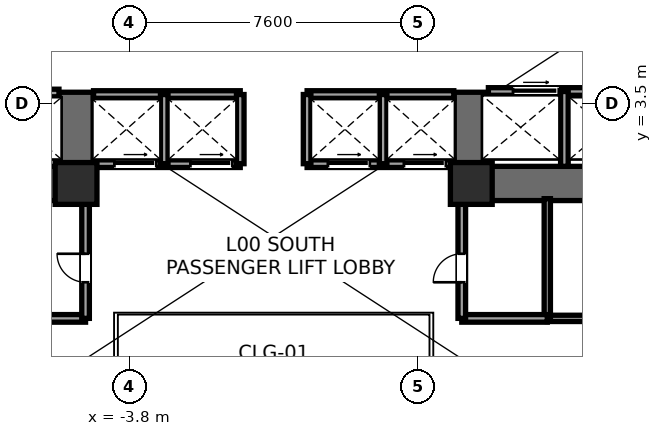
"""IFC4 building model, lengths in metres.
Left out: names, types, materials, properties, quantities, classifications, styles, units other than length and angle.
Written with IfcOpenShell. Run it as: python <this file> out.ifc"""

import sys

from ifc_helpers import new_model, si_unit, direction, frame, frame_2d, origin, origin_2d, place, context, subcontext, project, spatial, rectangle, extrude, element, fill, save


model = new_model("IFC4")
c1 = context("Model", 3, precision=1e-05, world=origin(), true_north=direction((0.0, 1.0)))
c2 = subcontext(c1, "Body", "Model", "MODEL_VIEW")
j1 = project(units=[si_unit("LENGTHUNIT", "METRE"), si_unit("PLANEANGLEUNIT", "RADIAN")], contexts=[c1])
p1 = place(None, origin())
s1 = spatial("IfcSite", under=j1, at=p1, CompositionType="ELEMENT")
p2 = place(p1, origin())
s2 = spatial("IfcBuilding", under=s1, at=p2, CompositionType="ELEMENT")
p3 = place(p2, origin())
s3 = spatial("IfcBuildingStorey", under=s2, at=p3, CompositionType="ELEMENT", Elevation=0.0)
p4 = place(p3, frame((-4.75, 1.4, 0.0), z_axis=(0.0, 0.0, 1.0), x_axis=(-1.0, 0.0, 0.0)))
e1 = element("IfcWall", 1, at=p4, inside=s3, PredefinedType="SHEAR", context=c2, shape_type="SweptSolid", body=[
    extrude(rectangle(XDim=9.3, YDim=0.9, at=frame_2d((4.65, 0.0))), origin(), (0.0, 0.0, 1.0), 6.0),
])
p5 = place(p4, frame((5.55, 0.0, 0.0)))
e2 = element("IfcOpeningElement", 2, at=p5, cuts=e1, PredefinedType="OPENING", context=c2, shape_type="SweptSolid", body=[
    extrude(rectangle(XDim=1.05, YDim=2.15, at=frame_2d((0.525, 1.075))), frame((0.0, 0.46, 0.0), z_axis=(0.0, -1.0, 0.0), x_axis=(1.0, 0.0, 0.0)), (0.0, 0.0, 1.0), 0.92),
])
p6 = place(p4, frame((3.88, 0.0, 0.0)))
e3 = element("IfcOpeningElement", 3, at=p6, cuts=e1, PredefinedType="OPENING", context=c2, shape_type="SweptSolid", body=[
    extrude(rectangle(XDim=1.1, YDim=2.2, at=frame_2d((0.55, 1.1))), frame((0.0, 0.46, 0.0), z_axis=(0.0, -1.0, 0.0), x_axis=(1.0, 0.0, 0.0)), (0.0, 0.0, 1.0), 0.92),
])
p7 = place(p3, frame((-5.2, 0.95, 0.0), z_axis=(0.0, 0.0, 1.0), x_axis=(0.0, 1.0, 0.0)))
e4 = element("IfcWall", 4, at=p7, inside=s3, PredefinedType="SHEAR", context=c2, shape_type="SweptSolid", body=[
    extrude(rectangle(XDim=2.85, YDim=0.9, at=frame_2d((1.425, 0.0))), origin(), (0.0, 0.0, 1.0), 6.0),
])
p8 = place(p3, frame((14.05, 1.4, 0.0), z_axis=(0.0, 0.0, 1.0), x_axis=(-1.0, 0.0, 0.0)))
e5 = element("IfcWall", 5, at=p8, inside=s3, PredefinedType="SHEAR", context=c2, shape_type="SweptSolid", body=[
    extrude(rectangle(XDim=9.3, YDim=0.9, at=frame_2d((4.65, 0.0))), origin(), (0.0, 0.0, 1.0), 6.0),
])
p9 = place(p8, frame((2.7, 0.0, 0.0)))
e6 = element("IfcOpeningElement", 6, at=p9, cuts=e5, PredefinedType="OPENING", context=c2, shape_type="SweptSolid", body=[
    extrude(rectangle(XDim=1.05, YDim=2.15, at=frame_2d((0.525, 1.075))), frame((0.0, 0.46, 0.0), z_axis=(0.0, -1.0, 0.0), x_axis=(1.0, 0.0, 0.0)), (0.0, 0.0, 1.0), 0.92),
])
p10 = place(p8, frame((4.7, 0.0, 0.0)))
e7 = element("IfcOpeningElement", 7, at=p10, cuts=e5, PredefinedType="OPENING", context=c2, shape_type="SweptSolid", body=[
    extrude(rectangle(XDim=1.1, YDim=2.2, at=frame_2d((0.55, 1.1))), frame((0.0, 0.46, 0.0), z_axis=(0.0, -1.0, 0.0), x_axis=(1.0, 0.0, 0.0)), (0.0, 0.0, 1.0), 0.92),
])
p11 = place(p3, frame((5.2, 0.95, 0.0), z_axis=(0.0, 0.0, 1.0), x_axis=(0.0, 1.0, 0.0)))
e8 = element("IfcWall", 8, at=p11, inside=s3, PredefinedType="SHEAR", context=c2, shape_type="SweptSolid", body=[
    extrude(rectangle(XDim=2.85, YDim=0.9, at=frame_2d((1.425, 0.0))), origin(), (0.0, 0.0, 1.0), 6.0),
])
for number, where, z_axis, x_axis in (
    (9, (-5.2, 1.4, 0.0), (0.0, 0.0, 1.0), (1.0, 0.0, 0.0)),
    (10, (5.2, 1.4, 0.0), (0.0, 0.0, 1.0), (1.0, 0.0, 0.0)),
):
    element("IfcColumn", number, at=place(p3, frame(where, z_axis=z_axis, x_axis=x_axis)), inside=s3, PredefinedType="COLUMN", context=c2, shape_type="SweptSolid", body=[
        extrude(rectangle(XDim=1.1, YDim=1.1, at=origin_2d()), origin(), (0.0, 0.0, 1.0), 6.0),
    ])
p12 = place(p3, frame((-7.2, -2.15, 0.0), z_axis=(0.0, 0.0, 1.0), x_axis=(1.0, 0.0, 0.0)))
e11 = element("IfcWall", 11, at=p12, inside=s3, PredefinedType="SOLIDWALL", context=c2, shape_type="SweptSolid", body=[
    extrude(rectangle(XDim=2.25, YDim=0.2, at=frame_2d((1.125, 0.0))), origin(), (0.0, 0.0, 1.0), 5.78),
])
p13 = place(p3, frame((-4.95, -2.15, 0.0), z_axis=(0.0, 0.0, 1.0), x_axis=(0.0, 1.0, 0.0)))
e12 = element("IfcWall", 12, at=p13, inside=s3, PredefinedType="SOLIDWALL", context=c2, shape_type="SweptSolid", body=[
    extrude(rectangle(XDim=3.15, YDim=0.2, at=frame_2d((1.575, 0.0))), origin(), (0.0, 0.0, 1.0), 5.148),
])
p14 = place(p13, frame((0.95, 0.0, 0.0)))
e13 = element("IfcOpeningElement", 13, at=p14, cuts=e12, PredefinedType="OPENING", context=c2, shape_type="SweptSolid", body=[
    extrude(rectangle(XDim=0.75, YDim=2.1, at=frame_2d((0.375, 1.05))), frame((0.0, 0.11, 0.0), z_axis=(0.0, -1.0, 0.0), x_axis=(1.0, 0.0, 0.0)), (0.0, 0.0, 1.0), 0.22),
])
p15 = place(p3, frame((7.2, -2.15, 0.0), z_axis=(0.0, 0.0, 1.0), x_axis=(1.0, 0.0, 0.0)))
e14 = element("IfcWall", 14, at=p15, inside=s3, PredefinedType="PARTITIONING", context=c2, shape_type="SweptSolid", body=[
    extrude(rectangle(XDim=6.25, YDim=0.165, at=frame_2d((3.125, 0.0))), origin(), (0.0, 0.0, 1.0), 5.78),
])
p16 = place(p3, frame((7.2, -2.15, 0.0), z_axis=(0.0, 0.0, 1.0), x_axis=(0.0, 1.0, 0.0)))
e15 = element("IfcWall", 15, at=p16, inside=s3, PredefinedType="PARTITIONING", context=c2, shape_type="SweptSolid", body=[
    extrude(rectangle(XDim=3.15, YDim=0.165, at=frame_2d((1.575, 0.0))), origin(), (0.0, 0.0, 1.0), 5.78),
])
p17 = place(p3, frame((4.95, -2.15, 0.0), z_axis=(0.0, 0.0, 1.0), x_axis=(1.0, 0.0, 0.0)))
e16 = element("IfcWall", 16, at=p17, inside=s3, PredefinedType="SOLIDWALL", context=c2, shape_type="SweptSolid", body=[
    extrude(rectangle(XDim=2.25, YDim=0.2, at=frame_2d((1.125, 0.0))), origin(), (0.0, 0.0, 1.0), 5.78),
])
p18 = place(p3, frame((4.95, -2.15, 0.0), z_axis=(0.0, 0.0, 1.0), x_axis=(0.0, 1.0, 0.0)))
e17 = element("IfcWall", 17, at=p18, inside=s3, PredefinedType="SOLIDWALL", context=c2, shape_type="SweptSolid", body=[
    extrude(rectangle(XDim=3.15, YDim=0.2, at=frame_2d((1.575, 0.0))), origin(), (0.0, 0.0, 1.0), 5.148),
])
p19 = place(p18, frame((0.95, 0.0, 0.0)))
e18 = element("IfcOpeningElement", 18, at=p19, cuts=e17, PredefinedType="OPENING", context=c2, shape_type="SweptSolid", body=[
    extrude(rectangle(XDim=0.75, YDim=2.1, at=frame_2d((0.375, 1.05))), frame((0.0, 0.11, 0.0), z_axis=(0.0, -1.0, 0.0), x_axis=(1.0, 0.0, 0.0)), (0.0, 0.0, 1.0), 0.22),
])
p20 = place(p3, frame((-9.78, 3.78, 0.0), z_axis=(0.0, 0.0, 1.0), x_axis=(1.0, 0.0, 0.0)))
e19 = element("IfcWall", 19, at=p20, inside=s3, PredefinedType="SOLIDWALL", context=c2, shape_type="SweptSolid", body=[
    extrude(rectangle(XDim=4.13, YDim=0.2, at=frame_2d((2.065, 0.0))), origin(), (0.0, 0.0, 1.0), 5.78),
])
p21 = place(p20, frame((2.72, 0.0, 0.0)))
e20 = element("IfcOpeningElement", 20, at=p21, cuts=e19, PredefinedType="OPENING", context=c2, shape_type="SweptSolid", body=[
    extrude(rectangle(XDim=1.1, YDim=2.2, at=frame_2d((0.55, 1.1))), frame((0.0, 0.11, 0.0), z_axis=(0.0, -1.0, 0.0), x_axis=(1.0, 0.0, 0.0)), (0.0, 0.0, 1.0), 0.22),
])
p22 = place(p3, frame((5.65, 3.82, 0.0), z_axis=(0.0, 0.0, 1.0), x_axis=(1.0, 0.0, 0.0)))
e21 = element("IfcWall", 21, at=p22, inside=s3, PredefinedType="SOLIDWALL", context=c2, shape_type="SweptSolid", body=[
    extrude(rectangle(XDim=4.13, YDim=0.2, at=frame_2d((2.065, 0.0))), origin(), (0.0, 0.0, 1.0), 5.78),
])
p23 = place(p22, frame((0.65, 0.0, 0.0)))
e22 = element("IfcOpeningElement", 22, at=p23, cuts=e21, PredefinedType="OPENING", context=c2, shape_type="SweptSolid", body=[
    extrude(rectangle(XDim=1.2, YDim=2.2, at=frame_2d((0.6, 1.1))), frame((0.0, 0.11, 0.0), z_axis=(0.0, -1.0, 0.0), x_axis=(1.0, 0.0, 0.0)), (0.0, 0.0, 1.0), 0.22),
])
p24 = place(p3, frame((7.65, 1.85, 0.0), z_axis=(0.0, 0.0, 1.0), x_axis=(0.0, 1.0, 0.0)))
e23 = element("IfcWall", 23, at=p24, inside=s3, PredefinedType="SOLIDWALL", context=c2, shape_type="SweptSolid", body=[
    extrude(rectangle(XDim=1.97, YDim=0.2, at=frame_2d((0.985, 0.0))), origin(), (0.0, 0.0, 1.0), 5.78),
])
p25 = place(p3, frame((-4.74, 1.92, 0.0), z_axis=(0.0, 0.0, 1.0), x_axis=(1.0, 0.0, 0.0)))
e24 = element("IfcWall", 24, at=p25, inside=s3, PredefinedType="SOLIDWALL", context=c2, shape_type="SweptSolid", body=[
    extrude(rectangle(XDim=3.86, YDim=0.2, at=frame_2d((1.93, 0.0))), origin(), (0.0, 0.0, 1.0), 4.77),
])
p26 = place(p25, frame((0.55, 0.0, 0.0)))
e25 = element("IfcOpeningElement", 25, at=p26, cuts=e24, PredefinedType="OPENING", context=c2, shape_type="SweptSolid", body=[
    extrude(rectangle(XDim=1.1, YDim=2.2, at=frame_2d((0.55, 1.1))), frame((0.0, 0.11, 0.0), z_axis=(0.0, -1.0, 0.0), x_axis=(1.0, 0.0, 0.0)), (0.0, 0.0, 1.0), 0.22),
])
p27 = place(p25, frame((2.55, 0.0, 0.0)))
e26 = element("IfcOpeningElement", 26, at=p27, cuts=e24, PredefinedType="OPENING", context=c2, shape_type="SweptSolid", body=[
    extrude(rectangle(XDim=1.1, YDim=2.2, at=frame_2d((0.55, 1.1))), frame((0.0, 0.11, 0.0), z_axis=(0.0, -1.0, 0.0), x_axis=(1.0, 0.0, 0.0)), (0.0, 0.0, 1.0), 0.22),
])
p28 = place(p3, frame((0.88, 1.92, 0.0), z_axis=(0.0, 0.0, 1.0), x_axis=(1.0, 0.0, 0.0)))
e27 = element("IfcWall", 27, at=p28, inside=s3, PredefinedType="SOLIDWALL", context=c2, shape_type="SweptSolid", body=[
    extrude(rectangle(XDim=3.86, YDim=0.2, at=frame_2d((1.93, 0.0))), origin(), (0.0, 0.0, 1.0), 4.77),
])
p29 = place(p28, frame((0.55, 0.0, 0.0)))
e28 = element("IfcOpeningElement", 28, at=p29, cuts=e27, PredefinedType="OPENING", context=c2, shape_type="SweptSolid", body=[
    extrude(rectangle(XDim=1.1, YDim=2.2, at=frame_2d((0.55, 1.1))), frame((0.0, 0.11, 0.0), z_axis=(0.0, -1.0, 0.0), x_axis=(1.0, 0.0, 0.0)), (0.0, 0.0, 1.0), 0.22),
])
p30 = place(p28, frame((2.55, 0.0, 0.0)))
e29 = element("IfcOpeningElement", 29, at=p30, cuts=e27, PredefinedType="OPENING", context=c2, shape_type="SweptSolid", body=[
    extrude(rectangle(XDim=1.1, YDim=2.2, at=frame_2d((0.55, 1.1))), frame((0.0, 0.11, 0.0), z_axis=(0.0, -1.0, 0.0), x_axis=(1.0, 0.0, 0.0)), (0.0, 0.0, 1.0), 0.22),
])
for number, where, z_axis, x_axis in (
    (30, (-4.74, 3.74, 0.0), (0.0, 0.0, 1.0), (1.0, 0.0, 0.0)),
    (31, (0.88, 3.74, 0.0), (0.0, 0.0, 1.0), (1.0, 0.0, 0.0)),
):
    element("IfcWall", number, at=place(p3, frame(where, z_axis=z_axis, x_axis=x_axis)), inside=s3, PredefinedType="SOLIDWALL", context=c2, shape_type="SweptSolid", body=[
        extrude(rectangle(XDim=3.86, YDim=0.2, at=frame_2d((1.93, 0.0))), origin(), (0.0, 0.0, 1.0), 5.78),
    ])
for number, where, z_axis, x_axis in (
    (32, (-2.88, 1.92, 0.0), (0.0, 0.0, 1.0), (0.0, 1.0, 0.0)),
    (33, (2.88, 1.92, 0.0), (0.0, 0.0, 1.0), (0.0, 1.0, 0.0)),
    (34, (-0.88, 1.92, 0.0), (0.0, 0.0, 1.0), (0.0, 1.0, 0.0)),
    (35, (0.88, 1.92, 0.0), (0.0, 0.0, 1.0), (0.0, 1.0, 0.0)),
):
    element("IfcWall", number, at=place(p3, frame(where, z_axis=z_axis, x_axis=x_axis)), inside=s3, PredefinedType="SOLIDWALL", context=c2, shape_type="SweptSolid", body=[
        extrude(rectangle(XDim=1.82, YDim=0.2, at=frame_2d((0.91, 0.0))), origin(), (0.0, 0.0, 1.0), 5.78),
    ])
p31 = place(p14, origin())
e36 = element("IfcDoor", 36, at=p31, inside=s3, OperationType="SINGLE_SWING_RIGHT", PredefinedType="DOOR", context=c2, shape_type="SweptSolid", body=[
    extrude(rectangle(XDim=0.75, YDim=2.1, at=frame_2d((0.375, 1.05))), frame((0.0, 0.025, 0.0), z_axis=(0.0, -1.0, 0.0), x_axis=(1.0, 0.0, 0.0)), (0.0, 0.0, 1.0), 0.05),
])
fill(e13, e36)
p32 = place(p19, origin())
e37 = element("IfcDoor", 37, at=p32, inside=s3, OperationType="SINGLE_SWING_LEFT", PredefinedType="DOOR", context=c2, shape_type="SweptSolid", body=[
    extrude(rectangle(XDim=0.75, YDim=2.1, at=frame_2d((0.375, 1.05))), frame((0.0, 0.025, 0.0), z_axis=(0.0, -1.0, 0.0), x_axis=(1.0, 0.0, 0.0)), (0.0, 0.0, 1.0), 0.05),
])
fill(e18, e37)
p33 = place(p23, origin())
e38 = element("IfcDoor", 38, at=p33, inside=s3, OperationType="SLIDING_TO_RIGHT", PredefinedType="DOOR", context=c2, shape_type="SweptSolid", body=[
    extrude(rectangle(XDim=1.2, YDim=2.2, at=frame_2d((0.6, 1.1))), frame((0.0, 0.025, 0.0), z_axis=(0.0, -1.0, 0.0), x_axis=(1.0, 0.0, 0.0)), (0.0, 0.0, 1.0), 0.05),
])
fill(e22, e38)
p34 = place(p26, origin())
e39 = element("IfcDoor", 39, at=p34, inside=s3, OperationType="SLIDING_TO_LEFT", PredefinedType="DOOR", context=c2, shape_type="SweptSolid", body=[
    extrude(rectangle(XDim=1.1, YDim=2.2, at=frame_2d((0.55, 1.1))), frame((0.0, 0.025, 0.0), z_axis=(0.0, -1.0, 0.0), x_axis=(1.0, 0.0, 0.0)), (0.0, 0.0, 1.0), 0.05),
])
fill(e25, e39)
p35 = place(p27, origin())
e40 = element("IfcDoor", 40, at=p35, inside=s3, OperationType="SLIDING_TO_LEFT", PredefinedType="DOOR", context=c2, shape_type="SweptSolid", body=[
    extrude(rectangle(XDim=1.1, YDim=2.2, at=frame_2d((0.55, 1.1))), frame((0.0, 0.025, 0.0), z_axis=(0.0, -1.0, 0.0), x_axis=(1.0, 0.0, 0.0)), (0.0, 0.0, 1.0), 0.05),
])
fill(e26, e40)
p36 = place(p29, origin())
e41 = element("IfcDoor", 41, at=p36, inside=s3, OperationType="SLIDING_TO_LEFT", PredefinedType="DOOR", context=c2, shape_type="SweptSolid", body=[
    extrude(rectangle(XDim=1.1, YDim=2.2, at=frame_2d((0.55, 1.1))), frame((0.0, 0.025, 0.0), z_axis=(0.0, -1.0, 0.0), x_axis=(1.0, 0.0, 0.0)), (0.0, 0.0, 1.0), 0.05),
])
fill(e28, e41)
p37 = place(p30, origin())
e42 = element("IfcDoor", 42, at=p37, inside=s3, OperationType="SLIDING_TO_LEFT", PredefinedType="DOOR", context=c2, shape_type="SweptSolid", body=[
    extrude(rectangle(XDim=1.1, YDim=2.2, at=frame_2d((0.55, 1.1))), frame((0.0, 0.025, 0.0), z_axis=(0.0, -1.0, 0.0), x_axis=(1.0, 0.0, 0.0)), (0.0, 0.0, 1.0), 0.05),
])
fill(e29, e42)
save(model, sys.argv[1])
